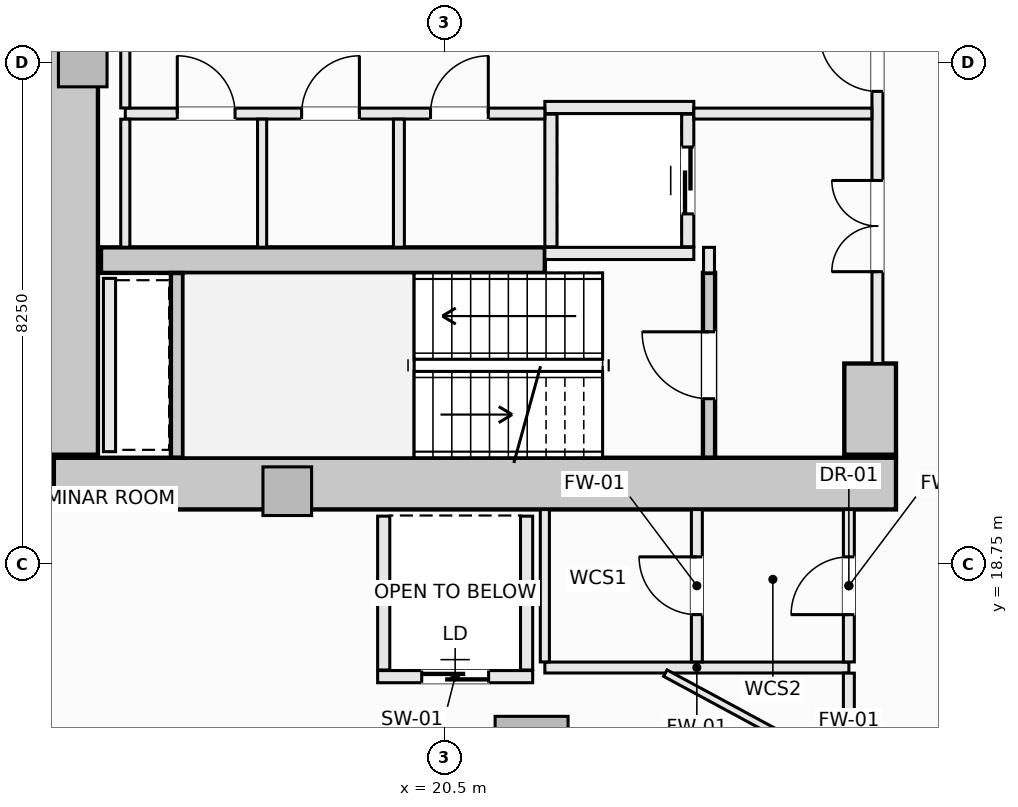
"""IFC4 building model, lengths in metres.
Left out: names, types, materials, properties, quantities, classifications, styles, units other than length and angle.
Written with IfcOpenShell. Run it as: python <this file> out.ifc"""

import sys

from ifc_helpers import new_model, si_unit, direction, frame, frame_2d, origin, origin_2d, place, context, subcontext, project, spatial, rectangle, extrude, element, fill, save


model = new_model("IFC4")
c1 = context("Model", 3, precision=1e-05, world=origin(), true_north=direction((0.0, 1.0)))
c2 = subcontext(c1, "Body", "Model", "MODEL_VIEW")
j1 = project(units=[si_unit("LENGTHUNIT", "METRE"), si_unit("PLANEANGLEUNIT", "RADIAN")], contexts=[c1])
p1 = place(None, origin())
s1 = spatial("IfcSite", under=j1, at=p1, CompositionType="ELEMENT")
p2 = place(p1, origin())
s2 = spatial("IfcBuilding", under=s1, at=p2, CompositionType="ELEMENT")
p3 = place(p2, frame((0.0, 0.0, 91.95)))
s3 = spatial("IfcBuildingStorey", under=s2, at=p3, CompositionType="ELEMENT", Elevation=91.95)
p4 = place(p3, frame((14.075, 20.075, -0.28), z_axis=(0.0, 0.0, 1.0), x_axis=(1.0, 0.0, 0.0)))
e1 = element("IfcWall", 1, at=p4, inside=s3, PredefinedType="SHEAR", context=c2, shape_type="SweptSolid", body=[
    extrude(rectangle(XDim=13.85, YDim=0.85, at=frame_2d((6.925, 0.0))), origin(), (0.0, 0.0, 1.0), 3.81),
])
p5 = place(p3, frame((14.375, 20.55, -0.28), z_axis=(0.0, 0.0, 1.0), x_axis=(0.0, 1.0, 0.0)))
e2 = element("IfcWall", 2, at=p5, inside=s3, PredefinedType="SHEAR", context=c2, shape_type="SweptSolid", body=[
    extrude(rectangle(XDim=12.9, YDim=0.85, at=frame_2d((6.45, 0.0))), origin(), (0.0, 0.0, 1.0), 3.81),
])
p6 = place(p3, frame((27.5, 20.55, -0.28), z_axis=(0.0, 0.0, 1.0), x_axis=(0.0, 1.0, 0.0)))
e3 = element("IfcWall", 3, at=p6, inside=s3, PredefinedType="SHEAR", context=c2, shape_type="SweptSolid", body=[
    extrude(rectangle(XDim=1.5, YDim=0.85, at=frame_2d((0.75, 0.0))), origin(), (0.0, 0.0, 1.0), 3.81),
])
p7 = place(p3, frame((14.85, 23.75, -0.28), z_axis=(0.0, 0.0, 1.0), x_axis=(1.0, 0.0, 0.0)))
e4 = element("IfcWall", 4, at=p7, inside=s3, PredefinedType="SHEAR", context=c2, shape_type="SweptSolid", body=[
    extrude(rectangle(XDim=7.3, YDim=0.42, at=frame_2d((3.65, 0.0))), origin(), (0.0, 0.0, 1.0), 3.81),
])
p8 = place(p3, frame((21.932, 15.648, -0.28), z_axis=(0.0, 0.0, 1.0), x_axis=(1.0, 0.0, 0.0)))
e5 = element("IfcColumn", 5, at=p8, inside=s3, PredefinedType="COLUMN", context=c2, shape_type="SweptSolid", body=[
    extrude(rectangle(XDim=1.2, YDim=1.2, at=origin_2d()), origin(), (0.0, 0.0, 1.0), 3.81),
])
for number, where, z_axis, x_axis in (
    (6, (14.55, 27.0, -0.28), (0.0, 0.0, 1.0), (1.0, 0.0, 0.0)),
    (7, (17.914, 19.95, -0.28), (0.0, 0.0, 1.0), (1.0, 0.0, 0.0)),
):
    element("IfcColumn", number, at=place(p3, frame(where, z_axis=z_axis, x_axis=x_axis)), inside=s3, PredefinedType="PILASTER", context=c2, shape_type="SweptSolid", body=[
        extrude(rectangle(XDim=0.8, YDim=0.8, at=origin_2d()), origin(), (0.0, 0.0, 1.0), 3.81),
    ])
p9 = place(p3, frame((24.85, 20.502, -0.28), z_axis=(0.0, 0.0, 1.0), x_axis=(0.0, 1.0, 0.0)))
e8 = element("IfcWall", 8, at=p9, inside=s3, PredefinedType="SHEAR", context=c2, shape_type="SweptSolid", body=[
    extrude(rectangle(XDim=3.038, YDim=0.2, at=frame_2d((1.519, 0.0))), origin(), (0.0, 0.0, 1.0), 3.81),
])
p10 = place(p9, frame((0.969, 0.0, 0.28)))
e9 = element("IfcOpeningElement", 9, at=p10, cuts=e8, PredefinedType="OPENING", context=c2, shape_type="SweptSolid", body=[
    extrude(rectangle(XDim=1.1, YDim=2.15, at=frame_2d((0.55, 1.075))), frame((0.0, 0.11, 0.0), z_axis=(0.0, -1.0, 0.0), x_axis=(1.0, 0.0, 0.0)), (0.0, 0.0, 1.0), 0.22),
])
p11 = place(p3, frame((16.1, 20.502, -0.28), z_axis=(0.0, 0.0, 1.0), x_axis=(0.0, 1.0, 0.0)))
e10 = element("IfcWall", 10, at=p11, inside=s3, PredefinedType="SHEAR", context=c2, shape_type="SweptSolid", body=[
    extrude(rectangle(XDim=3.036, YDim=0.2, at=frame_2d((1.518, 0.0))), origin(), (0.0, 0.0, 1.0), 3.81),
])
for number, where, z_axis, x_axis in (
    (11, (22.15, 26.26, 0.0), (0.0, 0.0, 1.0), (1.0, 0.0, 0.0)),
    (12, (22.15, 23.86, 0.0), (0.0, 0.0, 1.0), (1.0, 0.0, 0.0)),
):
    element("IfcWall", number, at=place(p3, frame(where, z_axis=z_axis, x_axis=x_axis)), inside=s3, PredefinedType="SOLIDWALL", context=c2, shape_type="SweptSolid", body=[
        extrude(rectangle(XDim=2.45, YDim=0.2, at=frame_2d((1.225, 0.0))), origin(), (0.0, 0.0, 1.0), 3.53),
    ])
p12 = place(p3, frame((22.25, 23.97, 0.0), z_axis=(0.0, 0.0, 1.0), x_axis=(0.0, 1.0, 0.0)))
e13 = element("IfcWall", 13, at=p12, inside=s3, PredefinedType="SOLIDWALL", context=c2, shape_type="SweptSolid", body=[
    extrude(rectangle(XDim=2.18, YDim=0.2, at=frame_2d((1.09, 0.0))), origin(), (0.0, 0.0, 1.0), 3.53),
])
p13 = place(p3, frame((24.5, 23.97, 0.0), z_axis=(0.0, 0.0, 1.0), x_axis=(0.0, 1.0, 0.0)))
e14 = element("IfcWall", 14, at=p13, inside=s3, PredefinedType="SOLIDWALL", context=c2, shape_type="SweptSolid", body=[
    extrude(rectangle(XDim=2.18, YDim=0.2, at=frame_2d((1.09, 0.0))), origin(), (0.0, 0.0, 1.0), 3.53),
])
p14 = place(p13, frame((0.54, 0.0, 0.0)))
e15 = element("IfcOpeningElement", 15, at=p14, cuts=e14, PredefinedType="OPENING", context=c2, shape_type="SweptSolid", body=[
    extrude(rectangle(XDim=1.1, YDim=2.2, at=frame_2d((0.55, 1.1))), frame((0.0, 0.11, 0.0), z_axis=(0.0, -1.0, 0.0), x_axis=(1.0, 0.0, 0.0)), (0.0, 0.0, 1.0), 0.22),
])
p15 = place(p3, frame((19.4, 16.9, 0.0), z_axis=(0.0, 0.0, 1.0), x_axis=(1.0, 0.0, 0.0)))
e16 = element("IfcWall", 16, at=p15, inside=s3, PredefinedType="SOLIDWALL", context=c2, shape_type="SweptSolid", body=[
    extrude(rectangle(XDim=2.55, YDim=0.2, at=frame_2d((1.275, 0.0))), origin(), (0.0, 0.0, 1.0), 3.53),
])
p16 = place(p15, frame((0.725, 0.0, 0.0)))
e17 = element("IfcOpeningElement", 17, at=p16, cuts=e16, PredefinedType="OPENING", context=c2, shape_type="SweptSolid", body=[
    extrude(rectangle(XDim=1.1, YDim=2.2, at=frame_2d((0.55, 1.1))), frame((0.0, 0.11, 0.0), z_axis=(0.0, -1.0, 0.0), x_axis=(1.0, 0.0, 0.0)), (0.0, 0.0, 1.0), 0.22),
])
for number, where, z_axis, x_axis in (
    (18, (19.5, 17.01, 0.0), (0.0, 0.0, 1.0), (0.0, 1.0, 0.0)),
    (19, (21.85, 17.01, 0.0), (0.0, 0.0, 1.0), (0.0, 1.0, 0.0)),
):
    element("IfcWall", number, at=place(p3, frame(where, z_axis=z_axis, x_axis=x_axis)), inside=s3, PredefinedType="SOLIDWALL", context=c2, shape_type="SweptSolid", body=[
        extrude(rectangle(XDim=2.53, YDim=0.2, at=frame_2d((1.265, 0.0))), origin(), (0.0, 0.0, 1.0), 3.53),
    ])
p17 = place(p3, frame((14.99, 20.6, 0.0), z_axis=(0.0, 0.0, 1.0), x_axis=(0.0, 1.0, 0.0)))
e20 = element("IfcWall", 20, at=p17, inside=s3, PredefinedType="SOLIDWALL", context=c2, shape_type="SweptSolid", body=[
    extrude(rectangle(XDim=2.85, YDim=0.2, at=frame_2d((1.425, 0.0))), origin(), (0.0, 0.0, 1.0), 3.53),
])
p18 = place(p3, frame((24.85, 23.54, 0.0), z_axis=(0.0, 0.0, 1.0), x_axis=(0.0, 1.0, 0.0)))
e21 = element("IfcWall", 21, at=p18, inside=s3, PredefinedType="SOLIDWALL", context=c2, shape_type="SweptSolid", body=[
    extrude(rectangle(XDim=0.42, YDim=0.18, at=frame_2d((0.21, 0.0))), origin(), (0.0, 0.0, 1.0), 3.53),
])
p19 = place(p3, frame((27.62, 22.05, 0.0), z_axis=(0.0, 0.0, 1.0), x_axis=(0.0, 1.0, 0.0)))
e22 = element("IfcWall", 22, at=p19, inside=s3, PredefinedType="SOLIDWALL", context=c2, shape_type="SweptSolid", body=[
    extrude(rectangle(XDim=9.9, YDim=0.18, at=frame_2d((4.95, 0.0))), origin(), (0.0, 0.0, 1.0), 2.622),
])
p20 = place(p19, frame((4.475, 0.0, 0.0)))
e23 = element("IfcOpeningElement", 23, at=p20, cuts=e22, PredefinedType="OPENING", context=c2, shape_type="SweptSolid", body=[
    extrude(rectangle(XDim=0.95, YDim=2.1, at=frame_2d((0.475, 1.05))), frame((0.0, 0.1, 0.0), z_axis=(0.0, -1.0, 0.0), x_axis=(1.0, 0.0, 0.0)), (0.0, 0.0, 1.0), 0.2),
])
p21 = place(p19, frame((6.89, 0.0, 0.0)))
e24 = element("IfcOpeningElement", 24, at=p21, cuts=e22, PredefinedType="OPENING", context=c2, shape_type="SweptSolid", body=[
    extrude(rectangle(XDim=1.5, YDim=2.2, at=frame_2d((0.75, 1.1))), frame((0.0, 0.1, 0.0), z_axis=(0.0, -1.0, 0.0), x_axis=(1.0, 0.0, 0.0)), (0.0, 0.0, 1.0), 0.2),
])
p22 = place(p19, frame((1.51, 0.0, 0.0)))
e25 = element("IfcOpeningElement", 25, at=p22, cuts=e22, PredefinedType="OPENING", context=c2, shape_type="SweptSolid", body=[
    extrude(rectangle(XDim=1.5, YDim=2.2, at=frame_2d((0.75, 1.1))), frame((0.0, 0.1, 0.0), z_axis=(0.0, -1.0, 0.0), x_axis=(1.0, 0.0, 0.0)), (0.0, 0.0, 1.0), 0.2),
])
p23 = place(p3, frame((15.25, 26.16, 0.0), z_axis=(0.0, 0.0, 1.0), x_axis=(1.0, 0.0, 0.0)))
e26 = element("IfcWall", 26, at=p23, inside=s3, PredefinedType="SOLIDWALL", context=c2, shape_type="SweptSolid", body=[
    extrude(rectangle(XDim=6.9, YDim=0.18, at=frame_2d((3.45, 0.0))), origin(), (0.0, 0.0, 1.0), 3.53),
])
p24 = place(p23, frame((5.02, 0.0, 0.0)))
e27 = element("IfcOpeningElement", 27, at=p24, cuts=e26, PredefinedType="OPENING", context=c2, shape_type="SweptSolid", body=[
    extrude(rectangle(XDim=0.95, YDim=2.1, at=frame_2d((0.475, 1.05))), frame((0.0, 0.1, 0.0), z_axis=(0.0, -1.0, 0.0), x_axis=(1.0, 0.0, 0.0)), (0.0, 0.0, 1.0), 0.2),
])
p25 = place(p23, frame((0.855, 0.0, 0.0)))
e28 = element("IfcOpeningElement", 28, at=p25, cuts=e26, PredefinedType="OPENING", context=c2, shape_type="SweptSolid", body=[
    extrude(rectangle(XDim=0.95, YDim=2.1, at=frame_2d((0.475, 1.05))), frame((0.0, 0.1, 0.0), z_axis=(0.0, -1.0, 0.0), x_axis=(1.0, 0.0, 0.0)), (0.0, 0.0, 1.0), 0.2),
])
p26 = place(p23, frame((2.9, 0.0, 0.0)))
e29 = element("IfcOpeningElement", 29, at=p26, cuts=e26, PredefinedType="OPENING", context=c2, shape_type="SweptSolid", body=[
    extrude(rectangle(XDim=0.95, YDim=2.1, at=frame_2d((0.475, 1.05))), frame((0.0, 0.1, 0.0), z_axis=(0.0, -1.0, 0.0), x_axis=(1.0, 0.0, 0.0)), (0.0, 0.0, 1.0), 0.2),
])
p27 = place(p3, frame((24.6, 26.16, 0.0), z_axis=(0.0, 0.0, 1.0), x_axis=(1.0, 0.0, 0.0)))
e30 = element("IfcWall", 30, at=p27, inside=s3, PredefinedType="SOLIDWALL", context=c2, shape_type="SweptSolid", body=[
    extrude(rectangle(XDim=2.928, YDim=0.18, at=frame_2d((1.464, 0.0))), origin(), (0.0, 0.0, 1.0), 3.53),
])
p28 = place(p3, frame((15.25, 23.962, 0.0), z_axis=(0.0, 0.0, 1.0), x_axis=(0.0, 1.0, 0.0)))
e31 = element("IfcWall", 31, at=p28, inside=s3, PredefinedType="PARTITIONING", context=c2, shape_type="SweptSolid", body=[
    extrude(rectangle(XDim=2.106, YDim=0.15, at=frame_2d((1.053, 0.0))), origin(), (0.0, 0.0, 1.0), 3.53),
])
p29 = place(p3, frame((15.25, 26.252, 0.0), z_axis=(0.0, 0.0, 1.0), x_axis=(0.0, 1.0, 0.0)))
e32 = element("IfcWall", 32, at=p29, inside=s3, PredefinedType="PARTITIONING", context=c2, shape_type="SweptSolid", body=[
    extrude(rectangle(XDim=1.496, YDim=0.15, at=frame_2d((0.748, 0.0))), origin(), (0.0, 0.0, 1.0), 3.53),
])
p30 = place(p3, frame((19.75, 23.962, 0.0), z_axis=(0.0, 0.0, 1.0), x_axis=(0.0, 1.0, 0.0)))
e33 = element("IfcWall", 33, at=p30, inside=s3, PredefinedType="SOLIDWALL", context=c2, shape_type="SweptSolid", body=[
    extrude(rectangle(XDim=2.106, YDim=0.18, at=frame_2d((1.053, 0.0))), origin(), (0.0, 0.0, 1.0), 3.53),
])
p31 = place(p3, frame((17.5, 23.962, 0.0), z_axis=(0.0, 0.0, 1.0), x_axis=(0.0, 1.0, 0.0)))
e34 = element("IfcWall", 34, at=p31, inside=s3, PredefinedType="PARTITIONING", context=c2, shape_type="SweptSolid", body=[
    extrude(rectangle(XDim=2.106, YDim=0.15, at=frame_2d((1.053, 0.0))), origin(), (0.0, 0.0, 1.0), 3.53),
])
p32 = place(p3, frame((22.15, 17.05, 0.0), z_axis=(0.0, 0.0, 1.0), x_axis=(1.0, 0.0, 0.0)))
e35 = element("IfcWall", 35, at=p32, inside=s3, PredefinedType="SOLIDWALL", context=c2, shape_type="SweptSolid", body=[
    extrude(rectangle(XDim=5.0, YDim=0.18, at=frame_2d((2.5, 0.0))), origin(), (0.0, 0.0, 1.0), 3.53),
])
p33 = place(p3, frame((22.15, 17.142, 0.0), z_axis=(0.0, 0.0, 1.0), x_axis=(0.0, 1.0, 0.0)))
e36 = element("IfcWall", 36, at=p33, inside=s3, PredefinedType="PARTITIONING", context=c2, shape_type="SweptSolid", body=[
    extrude(rectangle(XDim=2.506, YDim=0.15, at=frame_2d((1.253, 0.0))), origin(), (0.0, 0.0, 1.0), 3.53),
])
p34 = place(p3, frame((24.65, 17.142, 0.0), z_axis=(0.0, 0.0, 1.0), x_axis=(0.0, 1.0, 0.0)))
e37 = element("IfcWall", 37, at=p34, inside=s3, PredefinedType="SOLIDWALL", context=c2, shape_type="SweptSolid", body=[
    extrude(rectangle(XDim=2.506, YDim=0.18, at=frame_2d((1.253, 0.0))), origin(), (0.0, 0.0, 1.0), 3.53),
])
p35 = place(p34, frame((0.778, 0.0, 0.0)))
e38 = element("IfcOpeningElement", 38, at=p35, cuts=e37, PredefinedType="OPENING", context=c2, shape_type="SweptSolid", body=[
    extrude(rectangle(XDim=0.95, YDim=2.1, at=frame_2d((0.475, 1.05))), frame((0.0, 0.1, 0.0), z_axis=(0.0, -1.0, 0.0), x_axis=(1.0, 0.0, 0.0)), (0.0, 0.0, 1.0), 0.2),
])
p36 = place(p3, frame((27.15, 11.75, 0.0), z_axis=(0.0, 0.0, 1.0), x_axis=(0.0, 1.0, 0.0)))
e39 = element("IfcWall", 39, at=p36, inside=s3, PredefinedType="SOLIDWALL", context=c2, shape_type="SweptSolid", body=[
    extrude(rectangle(XDim=5.208, YDim=0.18, at=frame_2d((2.604, 0.0))), origin(), (0.0, 0.0, 1.0), 3.53),
])
p37 = place(p36, frame((1.535, 0.0, 0.0)))
e40 = element("IfcOpeningElement", 40, at=p37, cuts=e39, PredefinedType="OPENING", context=c2, shape_type="SweptSolid", body=[
    extrude(rectangle(XDim=0.95, YDim=2.1, at=frame_2d((0.475, 1.05))), frame((0.0, 0.1, 0.0), z_axis=(0.0, -1.0, 0.0), x_axis=(1.0, 0.0, 0.0)), (0.0, 0.0, 1.0), 0.2),
])
p38 = place(p3, frame((27.15, 17.142, 0.0), z_axis=(0.0, 0.0, 1.0), x_axis=(0.0, 1.0, 0.0)))
e41 = element("IfcWall", 41, at=p38, inside=s3, PredefinedType="SOLIDWALL", context=c2, shape_type="SweptSolid", body=[
    extrude(rectangle(XDim=2.506, YDim=0.18, at=frame_2d((1.253, 0.0))), origin(), (0.0, 0.0, 1.0), 3.53),
])
p39 = place(p38, frame((0.778, 0.0, 0.0)))
e42 = element("IfcOpeningElement", 42, at=p39, cuts=e41, PredefinedType="OPENING", context=c2, shape_type="SweptSolid", body=[
    extrude(rectangle(XDim=0.95, YDim=2.1, at=frame_2d((0.475, 1.05))), frame((0.0, 0.1, 0.0), z_axis=(0.0, -1.0, 0.0), x_axis=(1.0, 0.0, 0.0)), (0.0, 0.0, 1.0), 0.2),
])
p40 = place(p3, frame((24.132, 16.958, 0.0), z_axis=(0.0, 0.0, 1.0), x_axis=(0.879874093471, -0.475206880882, 0.0)))
e43 = element("IfcWall", 43, at=p40, inside=s3, PredefinedType="PARTITIONING", context=c2, shape_type="SweptSolid", body=[
    extrude(rectangle(XDim=3.326, YDim=0.12, at=frame_2d((1.663, 0.0))), origin(), (0.0, 0.0, 1.0), 3.53),
])
p41 = place(p10, origin())
e44 = element("IfcDoor", 44, at=p41, inside=s3, OperationType="SINGLE_SWING_RIGHT", PredefinedType="DOOR", context=c2, shape_type="SweptSolid", body=[
    extrude(rectangle(XDim=1.1, YDim=2.15, at=frame_2d((0.55, 1.075))), frame((0.0, 0.025, 0.0), z_axis=(0.0, -1.0, 0.0), x_axis=(1.0, 0.0, 0.0)), (0.0, 0.0, 1.0), 0.05),
])
fill(e9, e44)
p42 = place(p14, origin())
e45 = element("IfcDoor", 45, at=p42, inside=s3, OperationType="SLIDING_TO_LEFT", PredefinedType="DOOR", context=c2, shape_type="SweptSolid", body=[
    extrude(rectangle(XDim=1.1, YDim=2.2, at=frame_2d((0.55, 1.1))), frame((0.0, 0.025, 0.0), z_axis=(0.0, -1.0, 0.0), x_axis=(1.0, 0.0, 0.0)), (0.0, 0.0, 1.0), 0.05),
])
fill(e15, e45)
p43 = place(p16, origin())
e46 = element("IfcDoor", 46, at=p43, inside=s3, OperationType="SLIDING_TO_LEFT", PredefinedType="DOOR", context=c2, shape_type="SweptSolid", body=[
    extrude(rectangle(XDim=1.1, YDim=2.2, at=frame_2d((0.55, 1.1))), frame((0.0, 0.025, 0.0), z_axis=(0.0, -1.0, 0.0), x_axis=(1.0, 0.0, 0.0)), (0.0, 0.0, 1.0), 0.05),
])
fill(e17, e46)
p44 = place(p20, origin())
e47 = element("IfcDoor", 47, at=p44, inside=s3, OperationType="SINGLE_SWING_RIGHT", PredefinedType="DOOR", context=c2, shape_type="SweptSolid", body=[
    extrude(rectangle(XDim=0.95, YDim=2.1, at=frame_2d((0.475, 1.05))), frame((0.0, 0.025, 0.0), z_axis=(0.0, -1.0, 0.0), x_axis=(1.0, 0.0, 0.0)), (0.0, 0.0, 1.0), 0.05),
])
fill(e23, e47)
p45 = place(p22, origin())
e48 = element("IfcDoor", 48, at=p45, inside=s3, OperationType="DOUBLE_DOOR_SINGLE_SWING", PredefinedType="DOOR", context=c2, shape_type="SweptSolid", body=[
    extrude(rectangle(XDim=1.5, YDim=2.2, at=frame_2d((0.75, 1.1))), frame((0.0, 0.025, 0.0), z_axis=(0.0, -1.0, 0.0), x_axis=(1.0, 0.0, 0.0)), (0.0, 0.0, 1.0), 0.05),
])
fill(e25, e48)
p46 = place(p24, origin())
e49 = element("IfcDoor", 49, at=p46, inside=s3, OperationType="SINGLE_SWING_RIGHT", PredefinedType="DOOR", context=c2, shape_type="SweptSolid", body=[
    extrude(rectangle(XDim=0.95, YDim=2.1, at=frame_2d((0.475, 1.05))), frame((0.0, 0.025, 0.0), z_axis=(0.0, -1.0, 0.0), x_axis=(1.0, 0.0, 0.0)), (0.0, 0.0, 1.0), 0.05),
])
fill(e27, e49)
p47 = place(p25, origin())
e50 = element("IfcDoor", 50, at=p47, inside=s3, OperationType="SINGLE_SWING_LEFT", PredefinedType="DOOR", context=c2, shape_type="SweptSolid", body=[
    extrude(rectangle(XDim=0.95, YDim=2.1, at=frame_2d((0.475, 1.05))), frame((0.0, 0.025, 0.0), z_axis=(0.0, -1.0, 0.0), x_axis=(1.0, 0.0, 0.0)), (0.0, 0.0, 1.0), 0.05),
])
fill(e28, e50)
p48 = place(p26, origin())
e51 = element("IfcDoor", 51, at=p48, inside=s3, OperationType="SINGLE_SWING_RIGHT", PredefinedType="DOOR", context=c2, shape_type="SweptSolid", body=[
    extrude(rectangle(XDim=0.95, YDim=2.1, at=frame_2d((0.475, 1.05))), frame((0.0, 0.025, 0.0), z_axis=(0.0, -1.0, 0.0), x_axis=(1.0, 0.0, 0.0)), (0.0, 0.0, 1.0), 0.05),
])
fill(e29, e51)
p49 = place(p39, origin())
e52 = element("IfcDoor", 52, at=p49, inside=s3, OperationType="SINGLE_SWING_LEFT", PredefinedType="DOOR", context=c2, shape_type="SweptSolid", body=[
    extrude(rectangle(XDim=0.95, YDim=2.1, at=frame_2d((0.475, 1.05))), frame((0.0, 0.025, 0.0), z_axis=(0.0, -1.0, 0.0), x_axis=(1.0, 0.0, 0.0)), (0.0, 0.0, 1.0), 0.05),
])
fill(e42, e52)
p50 = place(p35, origin())
e53 = element("IfcDoor", 53, at=p50, inside=s3, OperationType="SINGLE_SWING_RIGHT", PredefinedType="DOOR", context=c2, shape_type="SweptSolid", body=[
    extrude(rectangle(XDim=0.95, YDim=2.1, at=frame_2d((0.475, 1.05))), frame((0.0, 0.025, 0.0), z_axis=(0.0, -1.0, 0.0), x_axis=(1.0, 0.0, 0.0)), (0.0, 0.0, 1.0), 0.05),
])
fill(e38, e53)
save(model, sys.argv[1])
